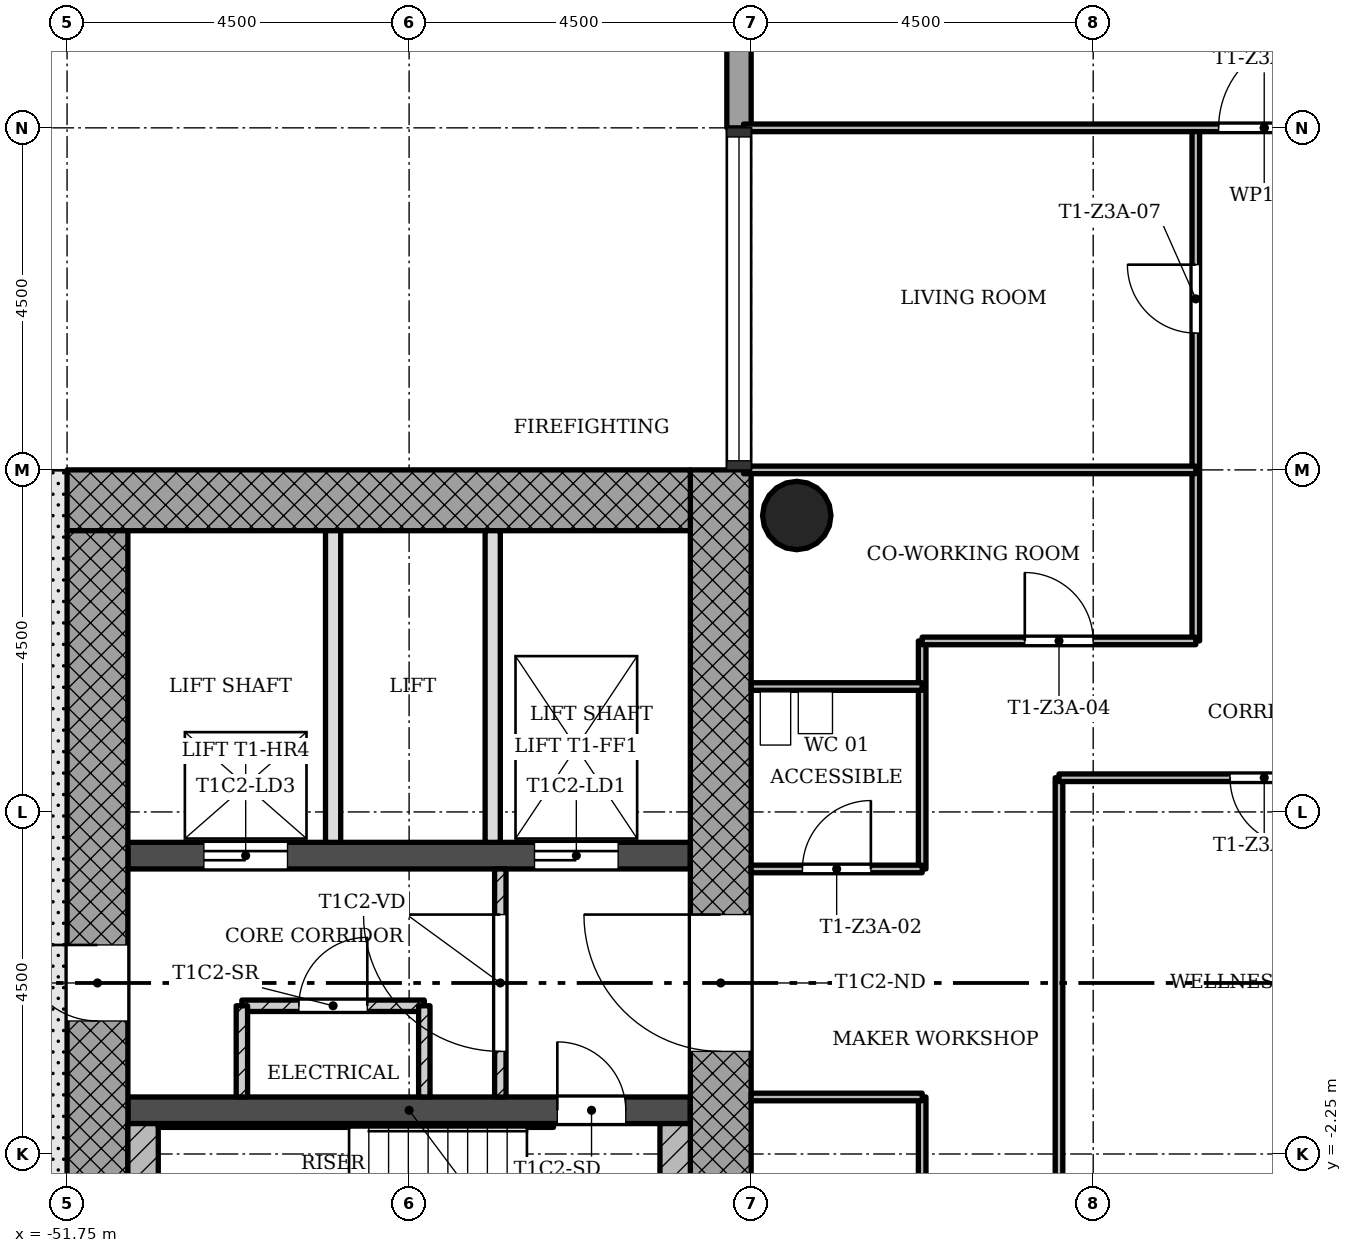
"""IFC4 building model, lengths in metres.
Left out: names, types, materials, properties, quantities, classifications, styles, units other than length and angle.
Written with IfcOpenShell. Run it as: python <this file> out.ifc"""

import sys

from ifc_helpers import new_model, si_unit, direction, frame, frame_2d, origin, origin_2d, place, context, subcontext, project, spatial, rectangle, hollow_circle, extrude, element, fill, save


model = new_model("IFC4")
c1 = context("Model", 3, precision=1e-05, world=origin(), true_north=direction((0.0, 1.0)))
c2 = subcontext(c1, "Body", "Model", "MODEL_VIEW")
j1 = project(units=[si_unit("LENGTHUNIT", "METRE"), si_unit("PLANEANGLEUNIT", "RADIAN")], contexts=[c1])
p1 = place(None, origin())
s1 = spatial("IfcSite", under=j1, at=p1, CompositionType="ELEMENT")
p2 = place(p1, origin())
s2 = spatial("IfcBuilding", under=s1, at=p2, CompositionType="ELEMENT")
p3 = place(p2, frame((0.0, 0.0, 133.7)))
s3 = spatial("IfcBuildingStorey", under=s2, at=p3, CompositionType="ELEMENT", Elevation=133.7)
p4 = place(p3, frame((-43.15, -5.95, 0.0), z_axis=(0.0, 0.0, 1.0), x_axis=(0.0, 1.0, 0.0)))
e1 = element("IfcWall", 1, at=p4, inside=s3, PredefinedType="SHEAR", context=c2, shape_type="SweptSolid", body=[
    extrude(rectangle(XDim=12.7, YDim=0.8, at=frame_2d((6.35, 0.0))), origin(), (0.0, 0.0, 1.0), 3.4),
])
p5 = place(p4, frame((5.05, 0.0, 0.0)))
e2 = element("IfcOpeningElement", 2, at=p5, cuts=e1, PredefinedType="OPENING", context=c2, shape_type="SweptSolid", body=[
    extrude(rectangle(XDim=1.8, YDim=2.1, at=frame_2d((0.9, 1.05))), frame((0.0, 0.41, 0.0), z_axis=(0.0, -1.0, 0.0), x_axis=(1.0, 0.0, 0.0)), (0.0, 0.0, 1.0), 0.82),
])
p6 = place(p3, frame((-43.55, 6.35, 0.0), z_axis=(0.0, 0.0, 1.0), x_axis=(-1.0, 0.0, 0.0)))
e3 = element("IfcWall", 3, at=p6, inside=s3, PredefinedType="SHEAR", context=c2, shape_type="SweptSolid", body=[
    extrude(rectangle(XDim=8.2, YDim=0.8, at=frame_2d((4.1, 0.0))), origin(), (0.0, 0.0, 1.0), 3.4),
])
p7 = place(p3, frame((-51.35, 5.95, 0.0), z_axis=(0.0, 0.0, 1.0), x_axis=(0.0, -1.0, 0.0)))
e4 = element("IfcWall", 4, at=p7, inside=s3, PredefinedType="SHEAR", context=c2, shape_type="SweptSolid", body=[
    extrude(rectangle(XDim=12.7, YDim=0.8, at=frame_2d((6.35, 0.0))), origin(), (0.0, 0.0, 1.0), 3.4),
])
p8 = place(p7, frame((5.45, 0.0, 0.0)))
e5 = element("IfcOpeningElement", 5, at=p8, cuts=e4, PredefinedType="OPENING", context=c2, shape_type="SweptSolid", body=[
    extrude(rectangle(XDim=1.0, YDim=2.1, at=frame_2d((0.5, 1.05))), frame((0.0, 0.41, 0.0), z_axis=(0.0, -1.0, 0.0), x_axis=(1.0, 0.0, 0.0)), (0.0, 0.0, 1.0), 0.82),
])
p9 = place(p3, frame((-50.95, -1.675, 0.0), z_axis=(0.0, 0.0, 1.0), x_axis=(1.0, 0.0, 0.0)))
e6 = element("IfcWall", 6, at=p9, inside=s3, PredefinedType="SHEAR", context=c2, shape_type="SweptSolid", body=[
    extrude(rectangle(XDim=7.4, YDim=0.35, at=frame_2d((3.7, 0.0))), origin(), (0.0, 0.0, 1.0), 3.4),
])
p10 = place(p9, frame((5.65, 0.0, 0.0)))
e7 = element("IfcOpeningElement", 7, at=p10, cuts=e6, PredefinedType="OPENING", context=c2, shape_type="SweptSolid", body=[
    extrude(rectangle(XDim=0.9, YDim=2.1, at=frame_2d((0.45, 1.05))), frame((0.0, 0.185, 0.0), z_axis=(0.0, -1.0, 0.0), x_axis=(1.0, 0.0, 0.0)), (0.0, 0.0, 1.0), 0.37),
])
p11 = place(p3, frame((-50.95, 1.675, 0.0), z_axis=(0.0, 0.0, 1.0), x_axis=(1.0, 0.0, 0.0)))
e8 = element("IfcWall", 8, at=p11, inside=s3, PredefinedType="SHEAR", context=c2, shape_type="SweptSolid", body=[
    extrude(rectangle(XDim=7.4, YDim=0.35, at=frame_2d((3.7, 0.0))), origin(), (0.0, 0.0, 1.0), 3.4),
])
p12 = place(p11, frame((5.35, 0.0, 0.0)))
e9 = element("IfcOpeningElement", 9, at=p12, cuts=e8, PredefinedType="OPENING", context=c2, shape_type="SweptSolid", body=[
    extrude(rectangle(XDim=1.1, YDim=2.1, at=frame_2d((0.55, 1.05))), frame((0.0, 0.185, 0.0), z_axis=(0.0, -1.0, 0.0), x_axis=(1.0, 0.0, 0.0)), (0.0, 0.0, 1.0), 0.37),
])
p13 = place(p11, frame((1.0, 0.0, 0.0)))
e10 = element("IfcOpeningElement", 10, at=p13, cuts=e8, PredefinedType="OPENING", context=c2, shape_type="SweptSolid", body=[
    extrude(rectangle(XDim=1.1, YDim=2.1, at=frame_2d((0.55, 1.05))), frame((0.0, 0.185, 0.0), z_axis=(0.0, -1.0, 0.0), x_axis=(1.0, 0.0, 0.0)), (0.0, 0.0, 1.0), 0.37),
])
p14 = place(p3, frame((-42.15, 6.15, 0.0), z_axis=(0.0, 0.0, 1.0), x_axis=(1.0, 0.0, 0.0)))
e11 = element("IfcColumn", 11, at=p14, inside=s3, PredefinedType="COLUMN", context=c2, shape_type="SweptSolid", body=[
    extrude(hollow_circle(Radius=0.45, WallThickness=0.032, at=origin_2d()), origin(), (0.0, 0.0, 1.0), 3.4),
])
p15 = place(p3, frame((-42.91, 12.75, -0.3), z_axis=(0.0, 0.0, 1.0), x_axis=(0.0, -1.0, 0.0)))
e12 = element("IfcWall", 12, at=p15, inside=s3, PredefinedType="STANDARD", context=c2, shape_type="SweptSolid", body=[
    extrude(rectangle(XDim=1.5, YDim=0.32, at=frame_2d((0.75, 0.0))), origin(), (0.0, 0.0, 1.0), 3.4),
])
p16 = place(p3, frame((-46.05, 1.5, 0.0), z_axis=(0.0, 0.0, 1.0), x_axis=(0.0, -1.0, 0.0)))
e13 = element("IfcWall", 13, at=p16, inside=s3, PredefinedType="PARTITIONING", context=c2, shape_type="SweptSolid", body=[
    extrude(rectangle(XDim=3.0, YDim=0.15, at=frame_2d((1.5, 0.0))), origin(), (0.0, 0.0, 1.0), 3.0),
])
p17 = place(p16, frame((0.6, 0.0, 0.0)))
e14 = element("IfcOpeningElement", 14, at=p17, cuts=e13, PredefinedType="OPENING", context=c2, shape_type="SweptSolid", body=[
    extrude(rectangle(XDim=1.8, YDim=2.1, at=frame_2d((0.9, 1.05))), frame((0.0, 0.085, 0.0), z_axis=(0.0, -1.0, 0.0), x_axis=(1.0, 0.0, 0.0)), (0.0, 0.0, 1.0), 0.17),
])
for number, where, z_axis, x_axis in (
    (15, (-46.15, 5.95, 0.0), (0.0, 0.0, 1.0), (0.0, -1.0, 0.0)),
    (16, (-48.25, 5.95, 0.0), (0.0, 0.0, 1.0), (0.0, -1.0, 0.0)),
):
    element("IfcWall", number, at=place(p3, frame(where, z_axis=z_axis, x_axis=x_axis)), inside=s3, PredefinedType="SOLIDWALL", context=c2, shape_type="SweptSolid", body=[
        extrude(rectangle(XDim=4.1, YDim=0.2, at=frame_2d((2.05, 0.0))), origin(), (0.0, 0.0, 1.0), 3.0),
    ])
p18 = place(p3, frame((-47.05, -0.3, 0.0), z_axis=(0.0, 0.0, 1.0), x_axis=(-1.0, 0.0, 0.0)))
e17 = element("IfcWall", 17, at=p18, inside=s3, PredefinedType="PARTITIONING", context=c2, shape_type="SweptSolid", body=[
    extrude(rectangle(XDim=2.4, YDim=0.15, at=frame_2d((1.2, 0.0))), origin(), (0.0, 0.0, 1.0), 3.0),
])
p19 = place(p18, frame((0.75, 0.0, 0.0)))
e18 = element("IfcOpeningElement", 18, at=p19, cuts=e17, PredefinedType="OPENING", context=c2, shape_type="SweptSolid", body=[
    extrude(rectangle(XDim=0.9, YDim=2.1, at=frame_2d((0.45, 1.05))), frame((0.0, 0.085, 0.0), z_axis=(0.0, -1.0, 0.0), x_axis=(1.0, 0.0, 0.0)), (0.0, 0.0, 1.0), 0.17),
])
for number, where, z_axis, x_axis in (
    (19, (-47.05, -0.3, 0.0), (0.0, 0.0, 1.0), (0.0, -1.0, 0.0)),
    (20, (-49.45, -0.3, 0.0), (0.0, 0.0, 1.0), (0.0, -1.0, 0.0)),
):
    element("IfcWall", number, at=place(p3, frame(where, z_axis=z_axis, x_axis=x_axis)), inside=s3, PredefinedType="PARTITIONING", context=c2, shape_type="SweptSolid", body=[
        extrude(rectangle(XDim=1.2, YDim=0.15, at=frame_2d((0.6, 0.0))), origin(), (0.0, 0.0, 1.0), 3.0),
    ])
for number, where, z_axis, x_axis in (
    (21, (-40.5, -4.5, 0.0), (0.0, 0.0, 1.0), (0.0, 1.0, 0.0)),
    (22, (-40.5, 1.5, 0.0), (0.0, 0.0, 1.0), (0.0, 1.0, 0.0)),
):
    element("IfcWall", number, at=place(p3, frame(where, z_axis=z_axis, x_axis=x_axis)), inside=s3, PredefinedType="PARTITIONING", context=c2, shape_type="SweptSolid", body=[
        extrude(rectangle(XDim=3.0, YDim=0.1, at=frame_2d((1.5, 0.0))), origin(), (0.0, 0.0, 1.0), 3.0),
    ])
p20 = place(p3, frame((-38.7, -2.7, 0.0), z_axis=(0.0, 0.0, 1.0), x_axis=(0.0, 1.0, 0.0)))
e23 = element("IfcWall", 23, at=p20, inside=s3, PredefinedType="PARTITIONING", context=c2, shape_type="SweptSolid", body=[
    extrude(rectangle(XDim=5.4, YDim=0.1, at=frame_2d((2.7, 0.0))), origin(), (0.0, 0.0, 1.0), 3.0),
])
p21 = place(p3, frame((-36.9, 4.5, 0.0), z_axis=(0.0, 0.0, 1.0), x_axis=(0.0, 1.0, 0.0)))
e24 = element("IfcWall", 24, at=p21, inside=s3, PredefinedType="PARTITIONING", context=c2, shape_type="SweptSolid", body=[
    extrude(rectangle(XDim=6.75, YDim=0.1, at=frame_2d((3.375, 0.0))), origin(), (0.0, 0.0, 1.0), 3.0),
])
p22 = place(p21, frame((4.05, 0.0, 0.0)))
e25 = element("IfcOpeningElement", 25, at=p22, cuts=e24, PredefinedType="OPENING", context=c2, shape_type="SweptSolid", body=[
    extrude(rectangle(XDim=0.9, YDim=2.1, at=frame_2d((0.45, 1.05))), frame((0.0, 0.06, 0.0), z_axis=(0.0, -1.0, 0.0), x_axis=(1.0, 0.0, 0.0)), (0.0, 0.0, 1.0), 0.12),
])
p23 = place(p3, frame((-42.75, -1.5, 0.0), z_axis=(0.0, 0.0, 1.0), x_axis=(1.0, 0.0, 0.0)))
e26 = element("IfcWall", 26, at=p23, inside=s3, PredefinedType="PARTITIONING", context=c2, shape_type="SweptSolid", body=[
    extrude(rectangle(XDim=2.25, YDim=0.1, at=frame_2d((1.125, 0.0))), origin(), (0.0, 0.0, 1.0), 3.0),
])
p24 = place(p3, frame((-42.75, 1.5, 0.0), z_axis=(0.0, 0.0, 1.0), x_axis=(1.0, 0.0, 0.0)))
e27 = element("IfcWall", 27, at=p24, inside=s3, PredefinedType="PARTITIONING", context=c2, shape_type="SweptSolid", body=[
    extrude(rectangle(XDim=2.25, YDim=0.1, at=frame_2d((1.125, 0.0))), origin(), (0.0, 0.0, 1.0), 3.0),
])
p25 = place(p24, frame((0.675, 0.0, 0.0)))
e28 = element("IfcOpeningElement", 28, at=p25, cuts=e27, PredefinedType="OPENING", context=c2, shape_type="SweptSolid", body=[
    extrude(rectangle(XDim=0.9, YDim=2.1, at=frame_2d((0.45, 1.05))), frame((0.0, 0.06, 0.0), z_axis=(0.0, -1.0, 0.0), x_axis=(1.0, 0.0, 0.0)), (0.0, 0.0, 1.0), 0.12),
])
p26 = place(p3, frame((-38.7, 2.7, 0.0), z_axis=(0.0, 0.0, 1.0), x_axis=(1.0, 0.0, 0.0)))
e29 = element("IfcWall", 29, at=p26, inside=s3, PredefinedType="PARTITIONING", context=c2, shape_type="SweptSolid", body=[
    extrude(rectangle(XDim=5.4, YDim=0.1, at=frame_2d((2.7, 0.0))), origin(), (0.0, 0.0, 1.0), 3.0),
])
p27 = place(p26, frame((2.25, 0.0, 0.0)))
e30 = element("IfcOpeningElement", 30, at=p27, cuts=e29, PredefinedType="OPENING", context=c2, shape_type="SweptSolid", body=[
    extrude(rectangle(XDim=0.9, YDim=2.1, at=frame_2d((0.45, 1.05))), frame((0.0, 0.06, 0.0), z_axis=(0.0, -1.0, 0.0), x_axis=(1.0, 0.0, 0.0)), (0.0, 0.0, 1.0), 0.12),
])
p28 = place(p3, frame((-42.75, 3.9, 0.0), z_axis=(0.0, 0.0, 1.0), x_axis=(1.0, 0.0, 0.0)))
e31 = element("IfcWall", 31, at=p28, inside=s3, PredefinedType="PARTITIONING", context=c2, shape_type="SweptSolid", body=[
    extrude(rectangle(XDim=2.25, YDim=0.1, at=frame_2d((1.125, 0.0))), origin(), (0.0, 0.0, 1.0), 3.0),
])
p29 = place(p3, frame((-40.5, 4.5, 0.0), z_axis=(0.0, 0.0, 1.0), x_axis=(1.0, 0.0, 0.0)))
e32 = element("IfcWall", 32, at=p29, inside=s3, PredefinedType="PARTITIONING", context=c2, shape_type="SweptSolid", body=[
    extrude(rectangle(XDim=3.6, YDim=0.1, at=frame_2d((1.8, 0.0))), origin(), (0.0, 0.0, 1.0), 3.0),
])
p30 = place(p29, frame((1.35, 0.0, 0.0)))
e33 = element("IfcOpeningElement", 33, at=p30, cuts=e32, PredefinedType="OPENING", context=c2, shape_type="SweptSolid", body=[
    extrude(rectangle(XDim=0.9, YDim=2.1, at=frame_2d((0.45, 1.05))), frame((0.0, 0.06, 0.0), z_axis=(0.0, -1.0, 0.0), x_axis=(1.0, 0.0, 0.0)), (0.0, 0.0, 1.0), 0.12),
])
p31 = place(p3, frame((-42.85, 6.75, 0.0), z_axis=(0.0, 0.0, 1.0), x_axis=(1.0, 0.0, 0.0)))
e34 = element("IfcWall", 34, at=p31, inside=s3, PredefinedType="PARTITIONING", context=c2, shape_type="SweptSolid", body=[
    extrude(rectangle(XDim=5.95, YDim=0.1, at=frame_2d((2.975, 0.0))), origin(), (0.0, 0.0, 1.0), 3.0),
])
p32 = place(p3, frame((-42.85, 11.25, 0.0), z_axis=(0.0, 0.0, 1.0), x_axis=(1.0, 0.0, 0.0)))
e35 = element("IfcWall", 35, at=p32, inside=s3, PredefinedType="PARTITIONING", context=c2, shape_type="SweptSolid", body=[
    extrude(rectangle(XDim=13.7, YDim=0.1, at=frame_2d((6.85, 0.0))), origin(), (0.0, 0.0, 1.0), 3.0),
])
p33 = place(p32, frame((6.25, 0.0, 0.0)))
e36 = element("IfcOpeningElement", 36, at=p33, cuts=e35, PredefinedType="OPENING", context=c2, shape_type="SweptSolid", body=[
    extrude(rectangle(XDim=1.2, YDim=2.1, at=frame_2d((0.6, 1.05))), frame((0.0, 0.06, 0.0), z_axis=(0.0, -1.0, 0.0), x_axis=(1.0, 0.0, 0.0)), (0.0, 0.0, 1.0), 0.12),
])
for number, where, z_axis, x_axis in (
    (37, (-50.75, -1.85, 0.0), (0.0, 0.0, 1.0), (0.0, -1.0, 0.0)),
    (38, (-43.75, -1.85, 0.0), (0.0, 0.0, 1.0), (0.0, -1.0, 0.0)),
):
    element("IfcWall", number, at=place(p3, frame(where, z_axis=z_axis, x_axis=x_axis)), inside=s3, PredefinedType="SHEAR", context=c2, shape_type="SweptSolid", body=[
        extrude(rectangle(XDim=4.1, YDim=0.4, at=frame_2d((2.05, 0.0))), origin(), (0.0, 0.0, 1.0), 3.4),
    ])
p34 = place(p3, frame((-45.35, -1.875, 0.0), z_axis=(0.0, 0.0, 1.0), x_axis=(-1.0, 0.0, 0.0)))
e39 = element("IfcWall", 39, at=p34, inside=s3, PredefinedType="SHEAR", context=c2, shape_type="SweptSolid", body=[
    extrude(rectangle(XDim=5.2, YDim=0.05, at=frame_2d((2.6, 0.0))), origin(), (0.0, 0.0, 1.0), 3.4),
])
p35 = place(p8, origin())
e40 = element("IfcDoor", 40, at=p35, inside=s3, OperationType="SINGLE_SWING_LEFT", PredefinedType="DOOR", context=c2, shape_type="SweptSolid", body=[
    extrude(rectangle(XDim=1.0, YDim=2.1, at=frame_2d((0.5, 1.05))), frame((0.0, 0.025, 0.0), z_axis=(0.0, -1.0, 0.0), x_axis=(1.0, 0.0, 0.0)), (0.0, 0.0, 1.0), 0.05),
])
fill(e5, e40)
p36 = place(p17, origin())
e41 = element("IfcDoor", 41, at=p36, inside=s3, OperationType="SINGLE_SWING_LEFT", PredefinedType="DOOR", context=c2, shape_type="SweptSolid", body=[
    extrude(rectangle(XDim=1.8, YDim=2.1, at=frame_2d((0.9, 1.05))), frame((0.0, 0.025, 0.0), z_axis=(0.0, -1.0, 0.0), x_axis=(1.0, 0.0, 0.0)), (0.0, 0.0, 1.0), 0.05),
])
fill(e14, e41)
p37 = place(p19, origin())
e42 = element("IfcDoor", 42, at=p37, inside=s3, OperationType="SINGLE_SWING_LEFT", PredefinedType="DOOR", context=c2, shape_type="SweptSolid", body=[
    extrude(rectangle(XDim=0.9, YDim=2.1, at=frame_2d((0.45, 1.05))), frame((0.0, 0.025, 0.0), z_axis=(0.0, -1.0, 0.0), x_axis=(1.0, 0.0, 0.0)), (0.0, 0.0, 1.0), 0.05),
])
fill(e18, e42)
p38 = place(p27, origin())
e43 = element("IfcDoor", 43, at=p38, inside=s3, OperationType="SINGLE_SWING_RIGHT", PredefinedType="DOOR", context=c2, shape_type="SweptSolid", body=[
    extrude(rectangle(XDim=0.9, YDim=2.1, at=frame_2d((0.45, 1.05))), frame((0.0, 0.025, 0.0), z_axis=(0.0, -1.0, 0.0), x_axis=(1.0, 0.0, 0.0)), (0.0, 0.0, 1.0), 0.05),
])
fill(e30, e43)
p39 = place(p25, origin())
e44 = element("IfcDoor", 44, at=p39, inside=s3, OperationType="SINGLE_SWING_LEFT", PredefinedType="DOOR", context=c2, shape_type="SweptSolid", body=[
    extrude(rectangle(XDim=0.9, YDim=2.1, at=frame_2d((0.45, 1.05))), frame((0.0, 0.025, 0.0), z_axis=(0.0, -1.0, 0.0), x_axis=(1.0, 0.0, 0.0)), (0.0, 0.0, 1.0), 0.05),
])
fill(e28, e44)
p40 = place(p30, origin())
e45 = element("IfcDoor", 45, at=p40, inside=s3, OperationType="SINGLE_SWING_RIGHT", PredefinedType="DOOR", context=c2, shape_type="SweptSolid", body=[
    extrude(rectangle(XDim=0.9, YDim=2.1, at=frame_2d((0.45, 1.05))), frame((0.0, 0.025, 0.0), z_axis=(0.0, -1.0, 0.0), x_axis=(1.0, 0.0, 0.0)), (0.0, 0.0, 1.0), 0.05),
])
fill(e33, e45)
p41 = place(p22, origin())
e46 = element("IfcDoor", 46, at=p41, inside=s3, OperationType="SINGLE_SWING_LEFT", PredefinedType="DOOR", context=c2, shape_type="SweptSolid", body=[
    extrude(rectangle(XDim=0.9, YDim=2.1, at=frame_2d((0.45, 1.05))), frame((0.0, 0.025, 0.0), z_axis=(0.0, -1.0, 0.0), x_axis=(1.0, 0.0, 0.0)), (0.0, 0.0, 1.0), 0.05),
])
fill(e25, e46)
p42 = place(p33, origin())
e47 = element("IfcDoor", 47, at=p42, inside=s3, OperationType="SINGLE_SWING_LEFT", PredefinedType="DOOR", context=c2, shape_type="SweptSolid", body=[
    extrude(rectangle(XDim=1.2, YDim=2.1, at=frame_2d((0.6, 1.05))), frame((0.0, 0.025, 0.0), z_axis=(0.0, -1.0, 0.0), x_axis=(1.0, 0.0, 0.0)), (0.0, 0.0, 1.0), 0.05),
])
fill(e36, e47)
p43 = place(p10, origin())
e48 = element("IfcDoor", 48, at=p43, inside=s3, OperationType="SINGLE_SWING_RIGHT", PredefinedType="DOOR", context=c2, shape_type="SweptSolid", body=[
    extrude(rectangle(XDim=0.9, YDim=2.1, at=frame_2d((0.45, 1.05))), frame((0.0, 0.025, 0.0), z_axis=(0.0, -1.0, 0.0), x_axis=(1.0, 0.0, 0.0)), (0.0, 0.0, 1.0), 0.05),
])
fill(e7, e48)
p44 = place(p12, origin())
e49 = element("IfcDoor", 49, at=p44, inside=s3, OperationType="SLIDING_TO_LEFT", PredefinedType="DOOR", context=c2, shape_type="SweptSolid", body=[
    extrude(rectangle(XDim=1.1, YDim=2.1, at=frame_2d((0.55, 1.05))), frame((0.0, 0.025, 0.0), z_axis=(0.0, -1.0, 0.0), x_axis=(1.0, 0.0, 0.0)), (0.0, 0.0, 1.0), 0.05),
])
fill(e9, e49)
p45 = place(p13, origin())
e50 = element("IfcDoor", 50, at=p45, inside=s3, OperationType="SLIDING_TO_LEFT", PredefinedType="DOOR", context=c2, shape_type="SweptSolid", body=[
    extrude(rectangle(XDim=1.1, YDim=2.1, at=frame_2d((0.55, 1.05))), frame((0.0, 0.025, 0.0), z_axis=(0.0, -1.0, 0.0), x_axis=(1.0, 0.0, 0.0)), (0.0, 0.0, 1.0), 0.05),
])
fill(e10, e50)
p46 = place(p5, origin())
e51 = element("IfcDoor", 51, at=p46, inside=s3, OperationType="SINGLE_SWING_LEFT", PredefinedType="DOOR", context=c2, shape_type="SweptSolid", body=[
    extrude(rectangle(XDim=1.8, YDim=2.1, at=frame_2d((0.9, 1.05))), frame((0.0, 0.025, 0.0), z_axis=(0.0, -1.0, 0.0), x_axis=(1.0, 0.0, 0.0)), (0.0, 0.0, 1.0), 0.05),
])
fill(e2, e51)
save(model, sys.argv[1])
